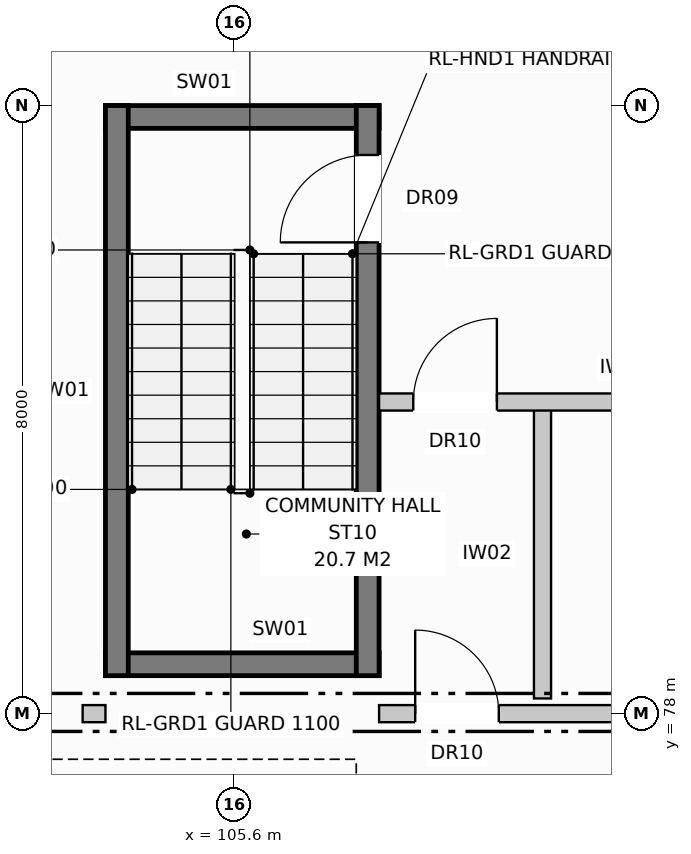
"""IFC4 building model, lengths in metres.
Left out: names, types, materials, properties, quantities, classifications, styles, units other than length and angle.
Written with IfcOpenShell. Run it as: python <this file> out.ifc"""

import sys

from ifc_helpers import new_model, si_unit, direction, frame, frame_2d, origin, origin_with_axes, place, context, subcontext, project, spatial, rectangle, extrude, element, fill, save


model = new_model("IFC4")
c1 = context("Model", 3, precision=1e-05, world=origin(), true_north=direction((0.0, 1.0)))
c2 = subcontext(c1, "Body", "Model", "MODEL_VIEW")
j1 = project(units=[si_unit("LENGTHUNIT", "METRE"), si_unit("PLANEANGLEUNIT", "RADIAN")], contexts=[c1])
p1 = place(None, origin())
s1 = spatial("IfcSite", under=j1, at=p1, CompositionType="ELEMENT")
p2 = place(p1, origin())
s2 = spatial("IfcBuilding", under=s1, at=p2, CompositionType="ELEMENT")
p3 = place(p2, frame((0.0, 0.0, -3.8)))
s3 = spatial("IfcBuildingStorey", under=s2, at=p3, CompositionType="ELEMENT", Elevation=-3.8)
for number, where, z_axis, x_axis in (
    (1, (103.9, 85.85, 0.0), (0.0, 0.0, 1.0), (1.0, 0.0, 0.0)),
    (2, (103.9, 78.65, 0.0), (0.0, 0.0, 1.0), (1.0, 0.0, 0.0)),
):
    element("IfcWall", number, at=place(p3, frame(where, z_axis=z_axis, x_axis=x_axis)), inside=s3, PredefinedType="SHEAR", context=c2, shape_type="SweptSolid", body=[
        extrude(rectangle(XDim=3.6, YDim=0.3, at=frame_2d((1.8, 0.0))), origin(), (0.0, 0.0, 1.0), 3.48),
    ])
p4 = place(p3, frame((104.05, 78.5, 0.0), z_axis=(0.0, 0.0, 1.0), x_axis=(0.0, 1.0, 0.0)))
e3 = element("IfcWall", 3, at=p4, inside=s3, PredefinedType="SHEAR", context=c2, shape_type="SweptSolid", body=[
    extrude(rectangle(XDim=7.5, YDim=0.3, at=frame_2d((3.75, 0.0))), origin(), (0.0, 0.0, 1.0), 3.48),
])
p5 = place(p3, frame((107.35, 78.5, 0.0), z_axis=(0.0, 0.0, 1.0), x_axis=(0.0, 1.0, 0.0)))
e4 = element("IfcWall", 4, at=p5, inside=s3, PredefinedType="SHEAR", context=c2, shape_type="SweptSolid", body=[
    extrude(rectangle(XDim=7.5, YDim=0.3, at=frame_2d((3.75, 0.0))), origin(), (0.0, 0.0, 1.0), 3.48),
])
p6 = place(p5, frame((5.7, 0.0, 0.0)))
e5 = element("IfcOpeningElement", 5, at=p6, cuts=e4, PredefinedType="OPENING", context=c2, shape_type="SweptSolid", body=[
    extrude(rectangle(XDim=1.15, YDim=2.15, at=frame_2d((0.575, 1.075))), frame((0.0, 0.162, 0.0), z_axis=(0.0, -1.0, 0.0), x_axis=(1.0, 0.0, 0.0)), (0.0, 0.0, 1.0), 0.324),
])
p7 = place(p3, frame((109.65, 78.2, 0.0), z_axis=(0.0, 0.0, 1.0), x_axis=(0.0, 1.0, 0.0)))
e6 = element("IfcWall", 6, at=p7, inside=s3, PredefinedType="PARTITIONING", context=c2, shape_type="SweptSolid", body=[
    extrude(rectangle(XDim=3.8, YDim=0.225, at=frame_2d((1.9, 0.0))), origin(), (0.0, 0.0, 1.0), 3.48),
])
p8 = place(p3, frame((107.5, 82.1, 0.0), z_axis=(0.0, 0.0, 1.0), x_axis=(1.0, 0.0, 0.0)))
e7 = element("IfcWall", 7, at=p8, inside=s3, PredefinedType="PARTITIONING", context=c2, shape_type="SweptSolid", body=[
    extrude(rectangle(XDim=4.91, YDim=0.225, at=frame_2d((2.455, 0.0))), origin(), (0.0, 0.0, 1.0), 3.48),
])
p9 = place(p8, frame((0.45, 0.0, 0.0)))
e8 = element("IfcOpeningElement", 8, at=p9, cuts=e7, PredefinedType="OPENING", context=c2, shape_type="SweptSolid", body=[
    extrude(rectangle(XDim=1.1, YDim=2.15, at=frame_2d((0.55, 1.075))), frame((0.0, 0.125, 0.0), z_axis=(0.0, -1.0, 0.0), x_axis=(1.0, 0.0, 0.0)), (0.0, 0.0, 1.0), 0.249),
])
p10 = place(p3, frame((103.6, 78.0, 0.0), z_axis=(0.0, 0.0, 1.0), x_axis=(1.0, 0.0, 0.0)))
e9 = element("IfcWall", 9, at=p10, inside=s3, PredefinedType="PARTITIONING", context=c2, shape_type="SweptSolid", body=[
    extrude(rectangle(XDim=0.3, YDim=0.225, at=frame_2d((0.15, 0.0))), origin(), (0.0, 0.0, 1.0), 3.48),
])
p11 = place(p3, frame((107.5, 78.0, 0.0), z_axis=(0.0, 0.0, 1.0), x_axis=(1.0, 0.0, 0.0)))
e10 = element("IfcWall", 10, at=p11, inside=s3, PredefinedType="PARTITIONING", context=c2, shape_type="SweptSolid", body=[
    extrude(rectangle(XDim=5.3, YDim=0.225, at=frame_2d((2.65, 0.0))), origin(), (0.0, 0.0, 1.0), 2.57),
])
p12 = place(p11, frame((0.475, 0.0, 0.0)))
e11 = element("IfcOpeningElement", 11, at=p12, cuts=e10, PredefinedType="OPENING", context=c2, shape_type="SweptSolid", body=[
    extrude(rectangle(XDim=1.1, YDim=2.15, at=frame_2d((0.55, 1.075))), frame((0.0, 0.125, 0.0), z_axis=(0.0, -1.0, 0.0), x_axis=(1.0, 0.0, 0.0)), (0.0, 0.0, 1.0), 0.249),
])
p13 = place(p6, origin_with_axes())
e12 = element("IfcDoor", 12, at=p13, inside=s3, OperationType="SINGLE_SWING_LEFT", PredefinedType="DOOR", context=c2, shape_type="SweptSolid", body=[
    extrude(rectangle(XDim=1.15, YDim=2.15, at=frame_2d((0.575, 1.075))), frame((0.0, 0.025, 0.0), z_axis=(0.0, -1.0, 0.0), x_axis=(1.0, 0.0, 0.0)), (0.0, 0.0, 1.0), 0.05),
])
fill(e5, e12)
p14 = place(p9, origin_with_axes())
e13 = element("IfcDoor", 13, at=p14, inside=s3, OperationType="SINGLE_SWING_RIGHT", PredefinedType="DOOR", context=c2, shape_type="SweptSolid", body=[
    extrude(rectangle(XDim=1.1, YDim=2.15, at=frame_2d((0.55, 1.075))), frame((0.0, 0.025, 0.0), z_axis=(0.0, -1.0, 0.0), x_axis=(1.0, 0.0, 0.0)), (0.0, 0.0, 1.0), 0.05),
])
fill(e8, e13)
p15 = place(p12, origin_with_axes())
e14 = element("IfcDoor", 14, at=p15, inside=s3, OperationType="SINGLE_SWING_LEFT", PredefinedType="DOOR", context=c2, shape_type="SweptSolid", body=[
    extrude(rectangle(XDim=1.1, YDim=2.15, at=frame_2d((0.55, 1.075))), frame((0.0, 0.025, 0.0), z_axis=(0.0, -1.0, 0.0), x_axis=(1.0, 0.0, 0.0)), (0.0, 0.0, 1.0), 0.05),
])
fill(e11, e14)
save(model, sys.argv[1])
